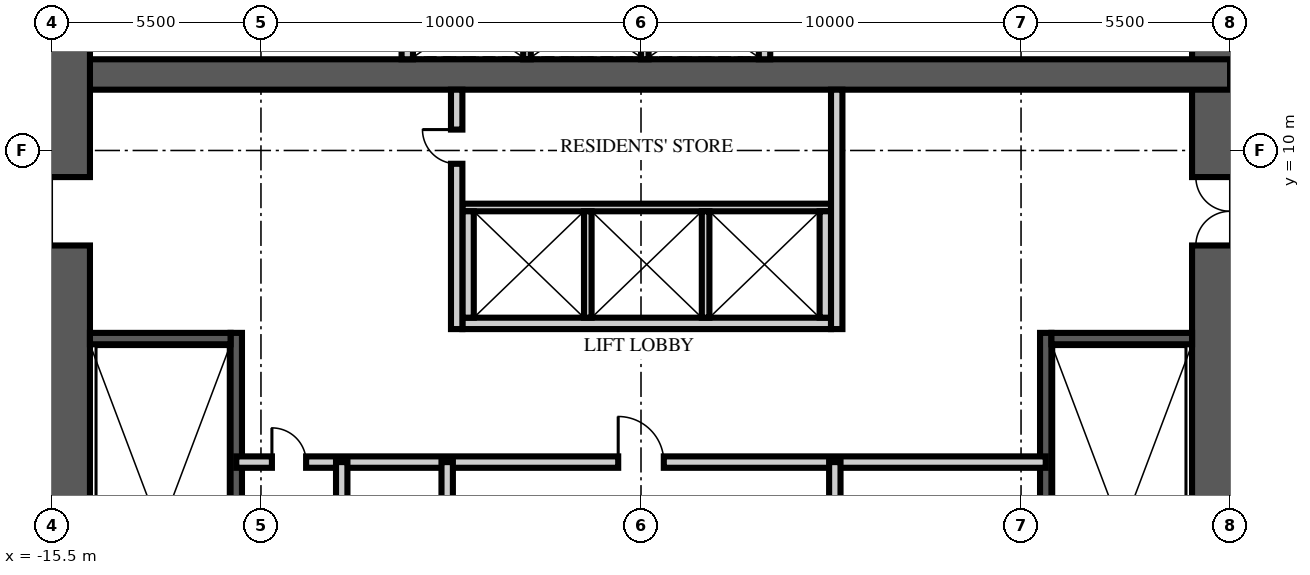
"""IFC4 building model, lengths in metres.
Left out: names, types, materials, properties, quantities, classifications, styles, units other than length and angle.
Written with IfcOpenShell. Run it as: python <this file> out.ifc"""

import sys

from ifc_helpers import new_model, si_unit, direction, frame, frame_2d, origin, place, context, subcontext, project, spatial, rectangle, extrude, element, fill, save


model = new_model("IFC4")
c1 = context("Model", 3, precision=1e-05, world=origin(), true_north=direction((0.0, 1.0)))
c2 = subcontext(c1, "Body", "Model", "MODEL_VIEW")
j1 = project(units=[si_unit("LENGTHUNIT", "METRE"), si_unit("PLANEANGLEUNIT", "RADIAN")], contexts=[c1])
p1 = place(None, origin())
s1 = spatial("IfcSite", under=j1, at=p1, CompositionType="ELEMENT")
p2 = place(p1, origin())
s2 = spatial("IfcBuilding", under=s1, at=p2, CompositionType="ELEMENT")
p3 = place(p2, frame((0.0, 0.0, 43.5)))
s3 = spatial("IfcBuildingStorey", under=s2, at=p3, CompositionType="ELEMENT", Elevation=43.5)
p4 = place(p3, frame((15.5, -15.5, -0.25), z_axis=(0.0, 0.0, 1.0), x_axis=(0.0, 1.0, 0.0)))
e1 = element("IfcWall", 1, at=p4, inside=s3, PredefinedType="SHEAR", context=c2, shape_type="SweptSolid", body=[
    extrude(rectangle(XDim=31.0, YDim=2.0, at=frame_2d((15.5, 0.0))), origin(), (0.0, 0.0, 1.0), 3.75),
])
p5 = place(p4, frame((6.5, 0.0, 0.25)))
e2 = element("IfcOpeningElement", 2, at=p5, cuts=e1, PredefinedType="OPENING", context=c2, shape_type="SweptSolid", body=[
    extrude(rectangle(XDim=1.2, YDim=2.1, at=frame_2d((0.6, 1.05))), frame((0.0, 1.01, 0.0), z_axis=(0.0, -1.0, 0.0), x_axis=(1.0, 0.0, 0.0)), (0.0, 0.0, 1.0), 2.02),
])
p6 = place(p4, frame((23.0, 0.0, 0.25)))
e3 = element("IfcOpeningElement", 3, at=p6, cuts=e1, PredefinedType="OPENING", context=c2, shape_type="SweptSolid", body=[
    extrude(rectangle(XDim=1.8, YDim=2.1, at=frame_2d((0.9, 1.05))), frame((0.0, 1.01, 0.0), z_axis=(0.0, -1.0, 0.0), x_axis=(1.0, 0.0, 0.0)), (0.0, 0.0, 1.0), 2.02),
])
p7 = place(p3, frame((-15.5, 12.0, -0.25), z_axis=(0.0, 0.0, 1.0), x_axis=(1.0, 0.0, 0.0)))
e4 = element("IfcWall", 4, at=p7, inside=s3, PredefinedType="SHEAR", context=c2, shape_type="SweptSolid", body=[
    extrude(rectangle(XDim=31.0, YDim=0.8, at=frame_2d((15.5, 0.0))), origin(), (0.0, 0.0, 1.0), 3.75),
])
p8 = place(p3, frame((-15.5, -15.5, -0.25), z_axis=(0.0, 0.0, 1.0), x_axis=(0.0, 1.0, 0.0)))
e5 = element("IfcWall", 5, at=p8, inside=s3, PredefinedType="SHEAR", context=c2, shape_type="SweptSolid", body=[
    extrude(rectangle(XDim=31.0, YDim=2.0, at=frame_2d((15.5, 0.0))), origin(), (0.0, 0.0, 1.0), 3.75),
])
p9 = place(p8, frame((6.5, 0.0, 0.25)))
e6 = element("IfcOpeningElement", 6, at=p9, cuts=e5, PredefinedType="OPENING", context=c2, shape_type="SweptSolid", body=[
    extrude(rectangle(XDim=1.2, YDim=2.1, at=frame_2d((0.6, 1.05))), frame((0.0, 1.01, 0.0), z_axis=(0.0, -1.0, 0.0), x_axis=(1.0, 0.0, 0.0)), (0.0, 0.0, 1.0), 2.02),
])
p10 = place(p8, frame((23.0, 0.0, 0.25)))
e7 = element("IfcOpeningElement", 7, at=p10, cuts=e5, PredefinedType="OPENING", context=c2, shape_type="SweptSolid", body=[
    extrude(rectangle(XDim=1.8, YDim=2.1, at=frame_2d((0.9, 1.05))), frame((0.0, 1.01, 0.0), z_axis=(0.0, -1.0, 0.0), x_axis=(1.0, 0.0, 0.0)), (0.0, 0.0, 1.0), 2.02),
])
p11 = place(p3, frame((-10.65, -4.9, 0.0), z_axis=(0.0, 0.0, 1.0), x_axis=(0.0, 1.0, 0.0)))
e8 = element("IfcWall", 8, at=p11, inside=s3, PredefinedType="SOLIDWALL", context=c2, shape_type="SweptSolid", body=[
    extrude(rectangle(XDim=10.1, YDim=0.3, at=frame_2d((5.05, 0.0))), origin(), (0.0, 0.0, 1.0), 3.5),
])
p12 = place(p3, frame((-14.5, 5.05, 0.0), z_axis=(0.0, 0.0, 1.0), x_axis=(1.0, 0.0, 0.0)))
e9 = element("IfcWall", 9, at=p12, inside=s3, PredefinedType="SOLIDWALL", context=c2, shape_type="SweptSolid", body=[
    extrude(rectangle(XDim=3.7, YDim=0.3, at=frame_2d((1.85, 0.0))), origin(), (0.0, 0.0, 1.0), 3.5),
])
p13 = place(p3, frame((10.65, -4.9, 0.0), z_axis=(0.0, 0.0, 1.0), x_axis=(0.0, 1.0, 0.0)))
e10 = element("IfcWall", 10, at=p13, inside=s3, PredefinedType="SOLIDWALL", context=c2, shape_type="SweptSolid", body=[
    extrude(rectangle(XDim=10.1, YDim=0.3, at=frame_2d((5.05, 0.0))), origin(), (0.0, 0.0, 1.0), 3.5),
])
p14 = place(p3, frame((14.5, 5.05, 0.0), z_axis=(0.0, 0.0, 1.0), x_axis=(-1.0, 0.0, 0.0)))
e11 = element("IfcWall", 11, at=p14, inside=s3, PredefinedType="SOLIDWALL", context=c2, shape_type="SweptSolid", body=[
    extrude(rectangle(XDim=3.7, YDim=0.3, at=frame_2d((1.85, 0.0))), origin(), (0.0, 0.0, 1.0), 3.5),
])
p15 = place(p3, frame((-4.7, 5.45, 0.0), z_axis=(0.0, 0.0, 1.0), x_axis=(1.0, 0.0, 0.0)))
e12 = element("IfcWall", 12, at=p15, inside=s3, PredefinedType="PARTITIONING", context=c2, shape_type="SweptSolid", body=[
    extrude(rectangle(XDim=9.7, YDim=0.3, at=frame_2d((4.85, 0.0))), origin(), (0.0, 0.0, 1.0), 3.5),
])
p16 = place(p3, frame((-4.7, 8.5, 0.0), z_axis=(0.0, 0.0, 1.0), x_axis=(1.0, 0.0, 0.0)))
e13 = element("IfcWall", 13, at=p16, inside=s3, PredefinedType="PARTITIONING", context=c2, shape_type="SweptSolid", body=[
    extrude(rectangle(XDim=9.7, YDim=0.2, at=frame_2d((4.85, 0.0))), origin(), (0.0, 0.0, 1.0), 3.5),
])
for number, where, z_axis, x_axis in (
    (14, (-4.55, 5.6, 0.0), (0.0, 0.0, 1.0), (0.0, 1.0, 0.0)),
    (15, (4.85, 5.6, 0.0), (0.0, 0.0, 1.0), (0.0, 1.0, 0.0)),
):
    element("IfcWall", number, at=place(p3, frame(where, z_axis=z_axis, x_axis=x_axis)), inside=s3, PredefinedType="PARTITIONING", context=c2, shape_type="SweptSolid", body=[
        extrude(rectangle(XDim=2.8, YDim=0.3, at=frame_2d((1.4, 0.0))), origin(), (0.0, 0.0, 1.0), 3.5),
    ])
for number, where, z_axis, x_axis in (
    (16, (-1.4, 5.6, 0.0), (0.0, 0.0, 1.0), (0.0, 1.0, 0.0)),
    (17, (1.7, 5.6, 0.0), (0.0, 0.0, 1.0), (0.0, 1.0, 0.0)),
):
    element("IfcWall", number, at=place(p3, frame(where, z_axis=z_axis, x_axis=x_axis)), inside=s3, PredefinedType="PARTITIONING", context=c2, shape_type="SweptSolid", body=[
        extrude(rectangle(XDim=2.8, YDim=0.2, at=frame_2d((1.4, 0.0))), origin(), (0.0, 0.0, 1.0), 3.5),
    ])
for number, where, z_axis, x_axis in (
    (18, (-6.15, 12.4, 0.0), (0.0, 0.0, 1.0), (0.0, 1.0, 0.0)),
    (19, (3.25, 12.4, 0.0), (0.0, 0.0, 1.0), (0.0, 1.0, 0.0)),
):
    element("IfcWall", number, at=place(p3, frame(where, z_axis=z_axis, x_axis=x_axis)), inside=s3, PredefinedType="PARTITIONING", context=c2, shape_type="SweptSolid", body=[
        extrude(rectangle(XDim=2.1, YDim=0.3, at=frame_2d((1.05, 0.0))), origin(), (0.0, 0.0, 1.0), 3.5),
    ])
for number, where, z_axis, x_axis in (
    (20, (-3.0, 12.4, 0.0), (0.0, 0.0, 1.0), (0.0, 1.0, 0.0)),
    (21, (0.1, 12.4, 0.0), (0.0, 0.0, 1.0), (0.0, 1.0, 0.0)),
):
    element("IfcWall", number, at=place(p3, frame(where, z_axis=z_axis, x_axis=x_axis)), inside=s3, PredefinedType="PARTITIONING", context=c2, shape_type="SweptSolid", body=[
        extrude(rectangle(XDim=2.1, YDim=0.2, at=frame_2d((1.05, 0.0))), origin(), (0.0, 0.0, 1.0), 3.5),
    ])
p17 = place(p3, frame((-10.65, 1.8, 0.0), z_axis=(0.0, 0.0, 1.0), x_axis=(1.0, 0.0, 0.0)))
e22 = element("IfcWall", 22, at=p17, inside=s3, PredefinedType="PARTITIONING", context=c2, shape_type="SweptSolid", body=[
    extrude(rectangle(XDim=21.3, YDim=0.3, at=frame_2d((10.65, 0.0))), origin(), (0.0, 0.0, 1.0), 3.5),
])
p18 = place(p17, frame((10.05, 0.0, 0.0)))
e23 = element("IfcOpeningElement", 23, at=p18, cuts=e22, PredefinedType="OPENING", context=c2, shape_type="SweptSolid", body=[
    extrude(rectangle(XDim=1.2, YDim=2.1, at=frame_2d((0.6, 1.05))), frame((0.0, 0.16, 0.0), z_axis=(0.0, -1.0, 0.0), x_axis=(1.0, 0.0, 0.0)), (0.0, 0.0, 1.0), 0.32),
])
p19 = place(p17, frame((0.938, 0.0, 0.0)))
e24 = element("IfcOpeningElement", 24, at=p19, cuts=e22, PredefinedType="OPENING", context=c2, shape_type="SweptSolid", body=[
    extrude(rectangle(XDim=0.9, YDim=2.1, at=frame_2d((0.45, 1.05))), frame((0.0, 0.16, 0.0), z_axis=(0.0, -1.0, 0.0), x_axis=(1.0, 0.0, 0.0)), (0.0, 0.0, 1.0), 0.32),
])
p20 = place(p3, frame((-5.1, -6.65, 0.0), z_axis=(0.0, 0.0, 1.0), x_axis=(0.0, 1.0, 0.0)))
e25 = element("IfcWall", 25, at=p20, inside=s3, PredefinedType="PARTITIONING", context=c2, shape_type="SweptSolid", body=[
    extrude(rectangle(XDim=8.45, YDim=0.3, at=frame_2d((4.225, 0.0))), origin(), (0.0, 0.0, 1.0), 3.5),
])
p21 = place(p20, frame((1.7, 0.0, 0.0)))
e26 = element("IfcOpeningElement", 26, at=p21, cuts=e25, PredefinedType="OPENING", context=c2, shape_type="SweptSolid", body=[
    extrude(rectangle(XDim=0.9, YDim=2.1, at=frame_2d((0.45, 1.05))), frame((0.0, 0.16, 0.0), z_axis=(0.0, -1.0, 0.0), x_axis=(1.0, 0.0, 0.0)), (0.0, 0.0, 1.0), 0.32),
])
p22 = place(p20, frame((5.925, 0.0, 0.0)))
e27 = element("IfcOpeningElement", 27, at=p22, cuts=e25, PredefinedType="OPENING", context=c2, shape_type="SweptSolid", body=[
    extrude(rectangle(XDim=0.9, YDim=2.1, at=frame_2d((0.45, 1.05))), frame((0.0, 0.16, 0.0), z_axis=(0.0, -1.0, 0.0), x_axis=(1.0, 0.0, 0.0)), (0.0, 0.0, 1.0), 0.32),
])
p23 = place(p3, frame((5.1, -6.65, 0.0), z_axis=(0.0, 0.0, 1.0), x_axis=(0.0, 1.0, 0.0)))
e28 = element("IfcWall", 28, at=p23, inside=s3, PredefinedType="PARTITIONING", context=c2, shape_type="SweptSolid", body=[
    extrude(rectangle(XDim=8.45, YDim=0.3, at=frame_2d((4.225, 0.0))), origin(), (0.0, 0.0, 1.0), 3.5),
])
p24 = place(p23, frame((1.866, 0.0, 0.0)))
e29 = element("IfcOpeningElement", 29, at=p24, cuts=e28, PredefinedType="OPENING", context=c2, shape_type="SweptSolid", body=[
    extrude(rectangle(XDim=0.9, YDim=2.1, at=frame_2d((0.45, 1.05))), frame((0.0, 0.16, 0.0), z_axis=(0.0, -1.0, 0.0), x_axis=(1.0, 0.0, 0.0)), (0.0, 0.0, 1.0), 0.32),
])
p25 = place(p23, frame((6.091, 0.0, 0.0)))
e30 = element("IfcOpeningElement", 30, at=p25, cuts=e28, PredefinedType="OPENING", context=c2, shape_type="SweptSolid", body=[
    extrude(rectangle(XDim=0.9, YDim=2.1, at=frame_2d((0.45, 1.05))), frame((0.0, 0.16, 0.0), z_axis=(0.0, -1.0, 0.0), x_axis=(1.0, 0.0, 0.0)), (0.0, 0.0, 1.0), 0.32),
])
p26 = place(p3, frame((-7.875, -2.35, 0.0), z_axis=(0.0, 0.0, 1.0), x_axis=(0.0, 1.0, 0.0)))
e31 = element("IfcWall", 31, at=p26, inside=s3, PredefinedType="PARTITIONING", context=c2, shape_type="SweptSolid", body=[
    extrude(rectangle(XDim=4.15, YDim=0.3, at=frame_2d((2.075, 0.0))), origin(), (0.0, 0.0, 1.0), 3.5),
])
p27 = place(p3, frame((-4.85, 5.3, 0.0), z_axis=(0.0, 0.0, 1.0), x_axis=(0.0, 1.0, 0.0)))
e32 = element("IfcWall", 32, at=p27, inside=s3, PredefinedType="PARTITIONING", context=c2, shape_type="SweptSolid", body=[
    extrude(rectangle(XDim=6.3, YDim=0.3, at=frame_2d((3.15, 0.0))), origin(), (0.0, 0.0, 1.0), 3.5),
])
p28 = place(p27, frame((4.35, 0.0, 0.0)))
e33 = element("IfcOpeningElement", 33, at=p28, cuts=e32, PredefinedType="OPENING", context=c2, shape_type="SweptSolid", body=[
    extrude(rectangle(XDim=0.9, YDim=2.1, at=frame_2d((0.45, 1.05))), frame((0.0, 0.16, 0.0), z_axis=(0.0, -1.0, 0.0), x_axis=(1.0, 0.0, 0.0)), (0.0, 0.0, 1.0), 0.32),
])
p29 = place(p3, frame((5.15, 5.3, 0.0), z_axis=(0.0, 0.0, 1.0), x_axis=(0.0, 1.0, 0.0)))
e34 = element("IfcWall", 34, at=p29, inside=s3, PredefinedType="PARTITIONING", context=c2, shape_type="SweptSolid", body=[
    extrude(rectangle(XDim=6.3, YDim=0.3, at=frame_2d((3.15, 0.0))), origin(), (0.0, 0.0, 1.0), 3.5),
])
p30 = place(p10, origin())
e35 = element("IfcDoor", 35, at=p30, inside=s3, OperationType="DOUBLE_DOOR_SINGLE_SWING", PredefinedType="DOOR", context=c2, shape_type="SweptSolid", body=[
    extrude(rectangle(XDim=1.8, YDim=2.1, at=frame_2d((0.9, 1.05))), frame((0.0, 0.025, 0.0), z_axis=(0.0, -1.0, 0.0), x_axis=(1.0, 0.0, 0.0)), (0.0, 0.0, 1.0), 0.05),
])
fill(e7, e35)
p31 = place(p6, origin())
e36 = element("IfcDoor", 36, at=p31, inside=s3, OperationType="DOUBLE_DOOR_SINGLE_SWING", PredefinedType="DOOR", context=c2, shape_type="SweptSolid", body=[
    extrude(rectangle(XDim=1.8, YDim=2.1, at=frame_2d((0.9, 1.05))), frame((0.0, 0.025, 0.0), z_axis=(0.0, -1.0, 0.0), x_axis=(1.0, 0.0, 0.0)), (0.0, 0.0, 1.0), 0.05),
])
fill(e3, e36)
p32 = place(p18, origin())
e37 = element("IfcDoor", 37, at=p32, inside=s3, OperationType="SINGLE_SWING_LEFT", PredefinedType="DOOR", context=c2, shape_type="SweptSolid", body=[
    extrude(rectangle(XDim=1.2, YDim=2.1, at=frame_2d((0.6, 1.05))), frame((0.0, 0.025, 0.0), z_axis=(0.0, -1.0, 0.0), x_axis=(1.0, 0.0, 0.0)), (0.0, 0.0, 1.0), 0.05),
])
fill(e23, e37)
p33 = place(p19, origin())
e38 = element("IfcDoor", 38, at=p33, inside=s3, OperationType="SINGLE_SWING_LEFT", PredefinedType="DOOR", context=c2, shape_type="SweptSolid", body=[
    extrude(rectangle(XDim=0.9, YDim=2.1, at=frame_2d((0.45, 1.05))), frame((0.0, 0.025, 0.0), z_axis=(0.0, -1.0, 0.0), x_axis=(1.0, 0.0, 0.0)), (0.0, 0.0, 1.0), 0.05),
])
fill(e24, e38)
p34 = place(p28, origin())
e39 = element("IfcDoor", 39, at=p34, inside=s3, OperationType="SINGLE_SWING_RIGHT", PredefinedType="DOOR", context=c2, shape_type="SweptSolid", body=[
    extrude(rectangle(XDim=0.9, YDim=2.1, at=frame_2d((0.45, 1.05))), frame((0.0, 0.025, 0.0), z_axis=(0.0, -1.0, 0.0), x_axis=(1.0, 0.0, 0.0)), (0.0, 0.0, 1.0), 0.05),
])
fill(e33, e39)
save(model, sys.argv[1])
